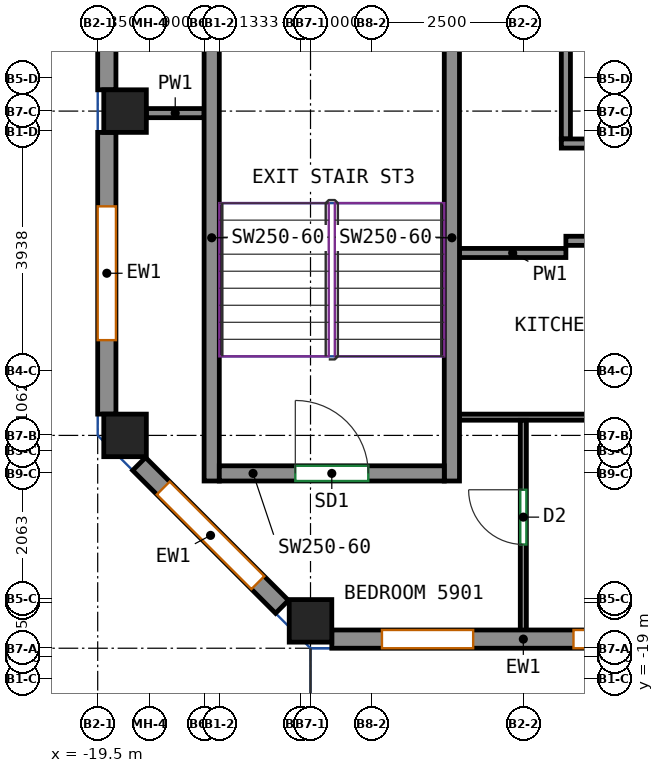
"""IFC4 building model, lengths in metres.
Left out: names, types, materials, properties, quantities, classifications, styles, units other than length and angle.
Written with IfcOpenShell. Run it as: python <this file> out.ifc"""

import sys

from ifc_helpers import new_model, si_unit, direction, frame, frame_2d, origin, origin_2d, place, context, subcontext, project, spatial, rectangle, extrude, source, transform, mapped, element, fill, save


model = new_model("IFC4")
c1 = context("Model", 3, precision=1e-05, world=origin(), true_north=direction((0.0, 1.0)))
c2 = subcontext(c1, "Body", "Model", "MODEL_VIEW")
j1 = project(units=[si_unit("LENGTHUNIT", "METRE"), si_unit("PLANEANGLEUNIT", "RADIAN")], contexts=[c1])
p1 = place(None, origin())
s1 = spatial("IfcSite", under=j1, at=p1, CompositionType="ELEMENT")
p2 = place(p1, origin())
s2 = spatial("IfcBuilding", under=s1, at=p2, CompositionType="ELEMENT")
p3 = place(p2, frame((0.0, 0.0, 245.8)))
s3 = spatial("IfcBuildingStorey", under=s2, at=p3, CompositionType="ELEMENT", Elevation=245.8)
m1 = source(origin(), c2, "Body", "SweptSolid", [
    extrude(rectangle(XDim=0.7, YDim=0.7, at=origin_2d()), origin(), (0.0, 0.0, 1.0), 3.12),
])
for number, where, z_axis, x_axis in (
    (1, (-19.05, -15.0, 0.0), (0.0, 0.0, 1.0), (1.0, 0.0, 0.0)),
    (2, (-19.05, -9.667, 0.0), (0.0, 0.0, 1.0), (1.0, 0.0, 0.0)),
    (3, (-16.0, -18.05, 0.0), (0.0, 0.0, 1.0), (1.0, 0.0, 0.0)),
):
    element("IfcColumn", number, at=place(p3, frame(where, z_axis=z_axis, x_axis=x_axis)), inside=s3, PredefinedType="COLUMN", context=c2, shape_type="MappedRepresentation", body=[
        mapped(m1, transform((0.0, 0.0, 0.0))),
    ])
m2 = source(origin(), c2, "Body", "SweptSolid", [
    extrude(rectangle(XDim=8.0, YDim=0.25, at=frame_2d((4.0, 0.0))), origin(), (0.0, 0.0, 1.0), 3.12),
])
for number, where, z_axis, x_axis in (
    (4, (-17.625, -15.75, 0.0), (0.0, 0.0, 1.0), (0.0, 1.0, 0.0)),
    (5, (-13.675, -15.75, 0.0), (0.0, 0.0, 1.0), (0.0, 1.0, 0.0)),
):
    element("IfcWall", number, at=place(p3, frame(where, z_axis=z_axis, x_axis=x_axis)), inside=s3, PredefinedType="SHEAR", context=c2, shape_type="MappedRepresentation", body=[
        mapped(m2, transform((0.0, 0.0, 0.0))),
    ])
m3 = source(origin(), c2, "Body", "SweptSolid", [
    extrude(rectangle(XDim=3.7, YDim=0.25, at=frame_2d((1.85, 0.0))), origin(), (0.0, 0.0, 1.0), 3.12),
])
p4 = place(p3, frame((-17.5, -15.625, 0.0), z_axis=(0.0, 0.0, 1.0), x_axis=(1.0, 0.0, 0.0)))
e6 = element("IfcWall", 6, at=p4, inside=s3, PredefinedType="SHEAR", context=c2, shape_type="MappedRepresentation", body=[
    mapped(m3, transform((0.0, 0.0, 0.0))),
])
p5 = place(p4, frame((1.25, 0.0, 0.0)))
e7 = element("IfcOpeningElement", 7, at=p5, cuts=e6, PredefinedType="OPENING", context=c2, shape_type="SweptSolid", body=[
    extrude(rectangle(XDim=1.2, YDim=2.1, at=frame_2d((0.6, 1.05))), frame((0.0, 0.135, 0.0), z_axis=(0.0, -1.0, 0.0), x_axis=(1.0, 0.0, 0.0)), (0.0, 0.0, 1.0), 0.27),
])
m4 = source(origin(), c2, "Body", "SweptSolid", [
    extrude(rectangle(XDim=6.3, YDim=0.3, at=frame_2d((3.15, 0.0))), origin(), (0.0, 0.0, 1.0), 3.12),
])
p6 = place(p3, frame((-15.65, -18.35, 0.0), z_axis=(0.0, 0.0, 1.0), x_axis=(1.0, 0.0, 0.0)))
e8 = element("IfcWall", 8, at=p6, inside=s3, PredefinedType="SOLIDWALL", context=c2, shape_type="MappedRepresentation", body=[
    mapped(m4, transform((0.0, 0.0, 0.0))),
])
p7 = place(p6, frame((0.825, 0.0, 0.8)))
e9 = element("IfcOpeningElement", 9, at=p7, cuts=e8, PredefinedType="OPENING", context=c2, shape_type="SweptSolid", body=[
    extrude(rectangle(XDim=1.5, YDim=2.05, at=frame_2d((0.75, 1.025))), frame((0.0, 0.16, 0.0), z_axis=(0.0, -1.0, 0.0), x_axis=(1.0, 0.0, 0.0)), (0.0, 0.0, 1.0), 0.32),
])
p8 = place(p6, frame((3.975, 0.0, 0.8)))
e10 = element("IfcOpeningElement", 10, at=p8, cuts=e8, PredefinedType="OPENING", context=c2, shape_type="SweptSolid", body=[
    extrude(rectangle(XDim=1.5, YDim=2.05, at=frame_2d((0.75, 1.025))), frame((0.0, 0.16, 0.0), z_axis=(0.0, -1.0, 0.0), x_axis=(1.0, 0.0, 0.0)), (0.0, 0.0, 1.0), 0.32),
])
m5 = source(origin(), c2, "Body", "SweptSolid", [
    extrude(rectangle(XDim=8.133, YDim=0.3, at=frame_2d((4.067, 0.0))), origin(), (0.0, 0.0, 1.0), 3.12),
])
p9 = place(p3, frame((-19.35, -1.183, 0.0), z_axis=(0.0, 0.0, 1.0), x_axis=(0.0, -1.0, 0.0)))
e11 = element("IfcWall", 11, at=p9, inside=s3, PredefinedType="SOLIDWALL", context=c2, shape_type="MappedRepresentation", body=[
    mapped(m5, transform((0.0, 0.0, 0.0))),
])
p10 = place(p9, frame((0.933, 0.0, 0.8)))
e12 = element("IfcOpeningElement", 12, at=p10, cuts=e11, PredefinedType="OPENING", context=c2, shape_type="SweptSolid", body=[
    extrude(rectangle(XDim=2.2, YDim=2.05, at=frame_2d((1.1, 1.025))), frame((0.0, 0.16, 0.0), z_axis=(0.0, -1.0, 0.0), x_axis=(1.0, 0.0, 0.0)), (0.0, 0.0, 1.0), 0.32),
])
p11 = place(p9, frame((5.0, 0.0, 0.8)))
e13 = element("IfcOpeningElement", 13, at=p11, cuts=e11, PredefinedType="OPENING", context=c2, shape_type="SweptSolid", body=[
    extrude(rectangle(XDim=2.2, YDim=2.05, at=frame_2d((1.1, 1.025))), frame((0.0, 0.16, 0.0), z_axis=(0.0, -1.0, 0.0), x_axis=(1.0, 0.0, 0.0)), (0.0, 0.0, 1.0), 0.32),
])
m6 = source(origin(), c2, "Body", "SweptSolid", [
    extrude(rectangle(XDim=4.633, YDim=0.3, at=frame_2d((2.317, 0.0))), origin(), (0.0, 0.0, 1.0), 3.12),
])
p12 = place(p3, frame((-19.35, -10.017, 0.0), z_axis=(0.0, 0.0, 1.0), x_axis=(0.0, -1.0, 0.0)))
e14 = element("IfcWall", 14, at=p12, inside=s3, PredefinedType="SOLIDWALL", context=c2, shape_type="MappedRepresentation", body=[
    mapped(m6, transform((0.0, 0.0, 0.0))),
])
p13 = place(p12, frame((1.217, 0.0, 0.8)))
e15 = element("IfcOpeningElement", 15, at=p13, cuts=e14, PredefinedType="OPENING", context=c2, shape_type="SweptSolid", body=[
    extrude(rectangle(XDim=2.2, YDim=2.05, at=frame_2d((1.1, 1.025))), frame((0.0, 0.16, 0.0), z_axis=(0.0, -1.0, 0.0), x_axis=(1.0, 0.0, 0.0)), (0.0, 0.0, 1.0), 0.32),
])
m7 = source(origin(), c2, "Body", "SweptSolid", [
    extrude(rectangle(XDim=3.323, YDim=0.3, at=frame_2d((1.662, 0.0))), origin(), (0.0, 0.0, 1.0), 3.12),
])
p14 = place(p3, frame((-18.819, -15.469, 0.0), z_axis=(0.0, 0.0, 1.0), x_axis=(0.707070049321, -0.707143511144, 0.0)))
e16 = element("IfcWall", 16, at=p14, inside=s3, PredefinedType="SOLIDWALL", context=c2, shape_type="MappedRepresentation", body=[
    mapped(m7, transform((0.0, 0.0, 0.0))),
])
p15 = place(p14, frame((0.562, 0.0, 0.8)))
e17 = element("IfcOpeningElement", 17, at=p15, cuts=e16, PredefinedType="OPENING", context=c2, shape_type="SweptSolid", body=[
    extrude(rectangle(XDim=2.2, YDim=2.05, at=frame_2d((1.1, 1.025))), frame((0.0, 0.16, 0.0), z_axis=(0.0, -1.0, 0.0), x_axis=(1.0, 0.0, 0.0)), (0.0, 0.0, 1.0), 0.32),
])
p16 = place(p3, frame((-11.8, -11.8, 0.0), z_axis=(0.0, 0.0, 1.0), x_axis=(1.0, 0.0, 0.0)))
e18 = element("IfcWall", 18, at=p16, inside=s3, PredefinedType="PARTITIONING", context=c2, shape_type="SweptSolid", body=[
    extrude(rectangle(XDim=29.55, YDim=0.15, at=frame_2d((14.775, 0.0))), origin(), (0.0, 0.0, 1.0), 3.12),
])
p17 = place(p16, frame((6.21, 0.0, 0.0)))
e19 = element("IfcOpeningElement", 19, at=p17, cuts=e18, PredefinedType="OPENING", context=c2, shape_type="SweptSolid", body=[
    extrude(rectangle(XDim=1.0, YDim=2.1, at=frame_2d((0.5, 1.05))), frame((0.0, 0.085, 0.0), z_axis=(0.0, -1.0, 0.0), x_axis=(1.0, 0.0, 0.0)), (0.0, 0.0, 1.0), 0.17),
])
p18 = place(p16, frame((23.111, 0.0, 0.0)))
e20 = element("IfcOpeningElement", 20, at=p18, cuts=e18, PredefinedType="OPENING", context=c2, shape_type="SweptSolid", body=[
    extrude(rectangle(XDim=1.0, YDim=2.1, at=frame_2d((0.5, 1.05))), frame((0.0, 0.085, 0.0), z_axis=(0.0, -1.0, 0.0), x_axis=(1.0, 0.0, 0.0)), (0.0, 0.0, 1.0), 0.17),
])
p19 = place(p3, frame((-13.55, -12.0, 0.0), z_axis=(0.0, 0.0, 1.0), x_axis=(1.0, 0.0, 0.0)))
e21 = element("IfcWall", 21, at=p19, inside=s3, PredefinedType="PARTITIONING", context=c2, shape_type="SweptSolid", body=[
    extrude(rectangle(XDim=1.75, YDim=0.15, at=frame_2d((0.875, 0.0))), origin(), (0.0, 0.0, 1.0), 3.12),
])
p20 = place(p3, frame((-18.7, -9.7, 0.0), z_axis=(0.0, 0.0, 1.0), x_axis=(1.0, 0.0, 0.0)))
e22 = element("IfcWall", 22, at=p20, inside=s3, PredefinedType="PARTITIONING", context=c2, shape_type="SweptSolid", body=[
    extrude(rectangle(XDim=0.95, YDim=0.15, at=frame_2d((0.475, 0.0))), origin(), (0.0, 0.0, 1.0), 3.12),
])
p21 = place(p3, frame((-11.8, -10.125, 0.0), z_axis=(0.0, 0.0, 1.0), x_axis=(0.0, 1.0, 0.0)))
e23 = element("IfcWall", 23, at=p21, inside=s3, PredefinedType="PARTITIONING", context=c2, shape_type="SweptSolid", body=[
    extrude(rectangle(XDim=4.785, YDim=0.15, at=frame_2d((2.393, 0.0))), origin(), (0.0, 0.0, 1.0), 3.12),
])
p22 = place(p21, frame((3.07, 0.0, 0.0)))
e24 = element("IfcOpeningElement", 24, at=p22, cuts=e23, PredefinedType="OPENING", context=c2, shape_type="SweptSolid", body=[
    extrude(rectangle(XDim=0.9, YDim=2.1, at=frame_2d((0.45, 1.05))), frame((0.0, 0.085, 0.0), z_axis=(0.0, -1.0, 0.0), x_axis=(1.0, 0.0, 0.0)), (0.0, 0.0, 1.0), 0.17),
])
p23 = place(p3, frame((-11.875, -10.2, 0.0), z_axis=(0.0, 0.0, 1.0), x_axis=(1.0, 0.0, 0.0)))
e25 = element("IfcWall", 25, at=p23, inside=s3, PredefinedType="PARTITIONING", context=c2, shape_type="SweptSolid", body=[
    extrude(rectangle(XDim=2.4, YDim=0.15, at=frame_2d((1.2, 0.0))), origin(), (0.0, 0.0, 1.0), 3.12),
])
p24 = place(p3, frame((-13.55, -14.7, 0.0), z_axis=(0.0, 0.0, 1.0), x_axis=(1.0, 0.0, 0.0)))
e26 = element("IfcWall", 26, at=p24, inside=s3, PredefinedType="PARTITIONING", context=c2, shape_type="SweptSolid", body=[
    extrude(rectangle(XDim=4.45, YDim=0.1, at=frame_2d((2.225, 0.0))), origin(), (0.0, 0.0, 1.0), 3.12),
])
p25 = place(p3, frame((-12.5, -18.25, 0.0), z_axis=(0.0, 0.0, 1.0), x_axis=(0.0, 1.0, 0.0)))
e27 = element("IfcWall", 27, at=p25, inside=s3, PredefinedType="PARTITIONING", context=c2, shape_type="SweptSolid", body=[
    extrude(rectangle(XDim=3.498, YDim=0.1, at=frame_2d((1.749, 0.0))), origin(), (0.0, 0.0, 1.0), 3.12),
])
p26 = place(p25, frame((1.456, 0.0, 0.0)))
e28 = element("IfcOpeningElement", 28, at=p26, cuts=e27, PredefinedType="OPENING", context=c2, shape_type="SweptSolid", body=[
    extrude(rectangle(XDim=0.9, YDim=2.1, at=frame_2d((0.45, 1.05))), frame((0.0, 0.06, 0.0), z_axis=(0.0, -1.0, 0.0), x_axis=(1.0, 0.0, 0.0)), (0.0, 0.0, 1.0), 0.12),
])
p27 = place(p7, origin())
e29 = element("IfcWindow", 29, at=p27, inside=s3, PartitioningType="SINGLE_PANEL", PredefinedType="WINDOW", context=c2, shape_type="SweptSolid", body=[
    extrude(rectangle(XDim=1.5, YDim=2.05, at=frame_2d((0.75, 1.025))), frame((0.0, 0.03, 0.0), z_axis=(0.0, -1.0, 0.0), x_axis=(1.0, 0.0, 0.0)), (0.0, 0.0, 1.0), 0.06),
])
fill(e9, e29)
p28 = place(p8, origin())
e30 = element("IfcWindow", 30, at=p28, inside=s3, PartitioningType="SINGLE_PANEL", PredefinedType="WINDOW", context=c2, shape_type="SweptSolid", body=[
    extrude(rectangle(XDim=1.5, YDim=2.05, at=frame_2d((0.75, 1.025))), frame((0.0, 0.03, 0.0), z_axis=(0.0, -1.0, 0.0), x_axis=(1.0, 0.0, 0.0)), (0.0, 0.0, 1.0), 0.06),
])
fill(e10, e30)
p29 = place(p13, origin())
e31 = element("IfcWindow", 31, at=p29, inside=s3, PartitioningType="SINGLE_PANEL", PredefinedType="WINDOW", context=c2, shape_type="SweptSolid", body=[
    extrude(rectangle(XDim=2.2, YDim=2.05, at=frame_2d((1.1, 1.025))), frame((0.0, 0.03, 0.0), z_axis=(0.0, -1.0, 0.0), x_axis=(1.0, 0.0, 0.0)), (0.0, 0.0, 1.0), 0.06),
])
fill(e15, e31)
p30 = place(p15, origin())
e32 = element("IfcWindow", 32, at=p30, inside=s3, PartitioningType="SINGLE_PANEL", PredefinedType="WINDOW", context=c2, shape_type="SweptSolid", body=[
    extrude(rectangle(XDim=2.2, YDim=2.05, at=frame_2d((1.1, 1.025))), frame((0.0, 0.03, 0.0), z_axis=(0.0, -1.0, 0.0), x_axis=(1.0, 0.0, 0.0)), (0.0, 0.0, 1.0), 0.06),
])
fill(e17, e32)
p31 = place(p5, origin())
e33 = element("IfcDoor", 33, at=p31, inside=s3, OperationType="DOUBLE_DOOR_SINGLE_SWING", PredefinedType="DOOR", context=c2, shape_type="SweptSolid", body=[
    extrude(rectangle(XDim=1.2, YDim=2.1, at=frame_2d((0.6, 1.05))), frame((0.0, 0.025, 0.0), z_axis=(0.0, -1.0, 0.0), x_axis=(1.0, 0.0, 0.0)), (0.0, 0.0, 1.0), 0.05),
])
fill(e7, e33)
p32 = place(p26, origin())
e34 = element("IfcDoor", 34, at=p32, inside=s3, OperationType="SINGLE_SWING_RIGHT", PredefinedType="DOOR", context=c2, shape_type="SweptSolid", body=[
    extrude(rectangle(XDim=0.9, YDim=2.1, at=frame_2d((0.45, 1.05))), frame((0.0, 0.025, 0.0), z_axis=(0.0, -1.0, 0.0), x_axis=(1.0, 0.0, 0.0)), (0.0, 0.0, 1.0), 0.05),
])
fill(e28, e34)
save(model, sys.argv[1])
